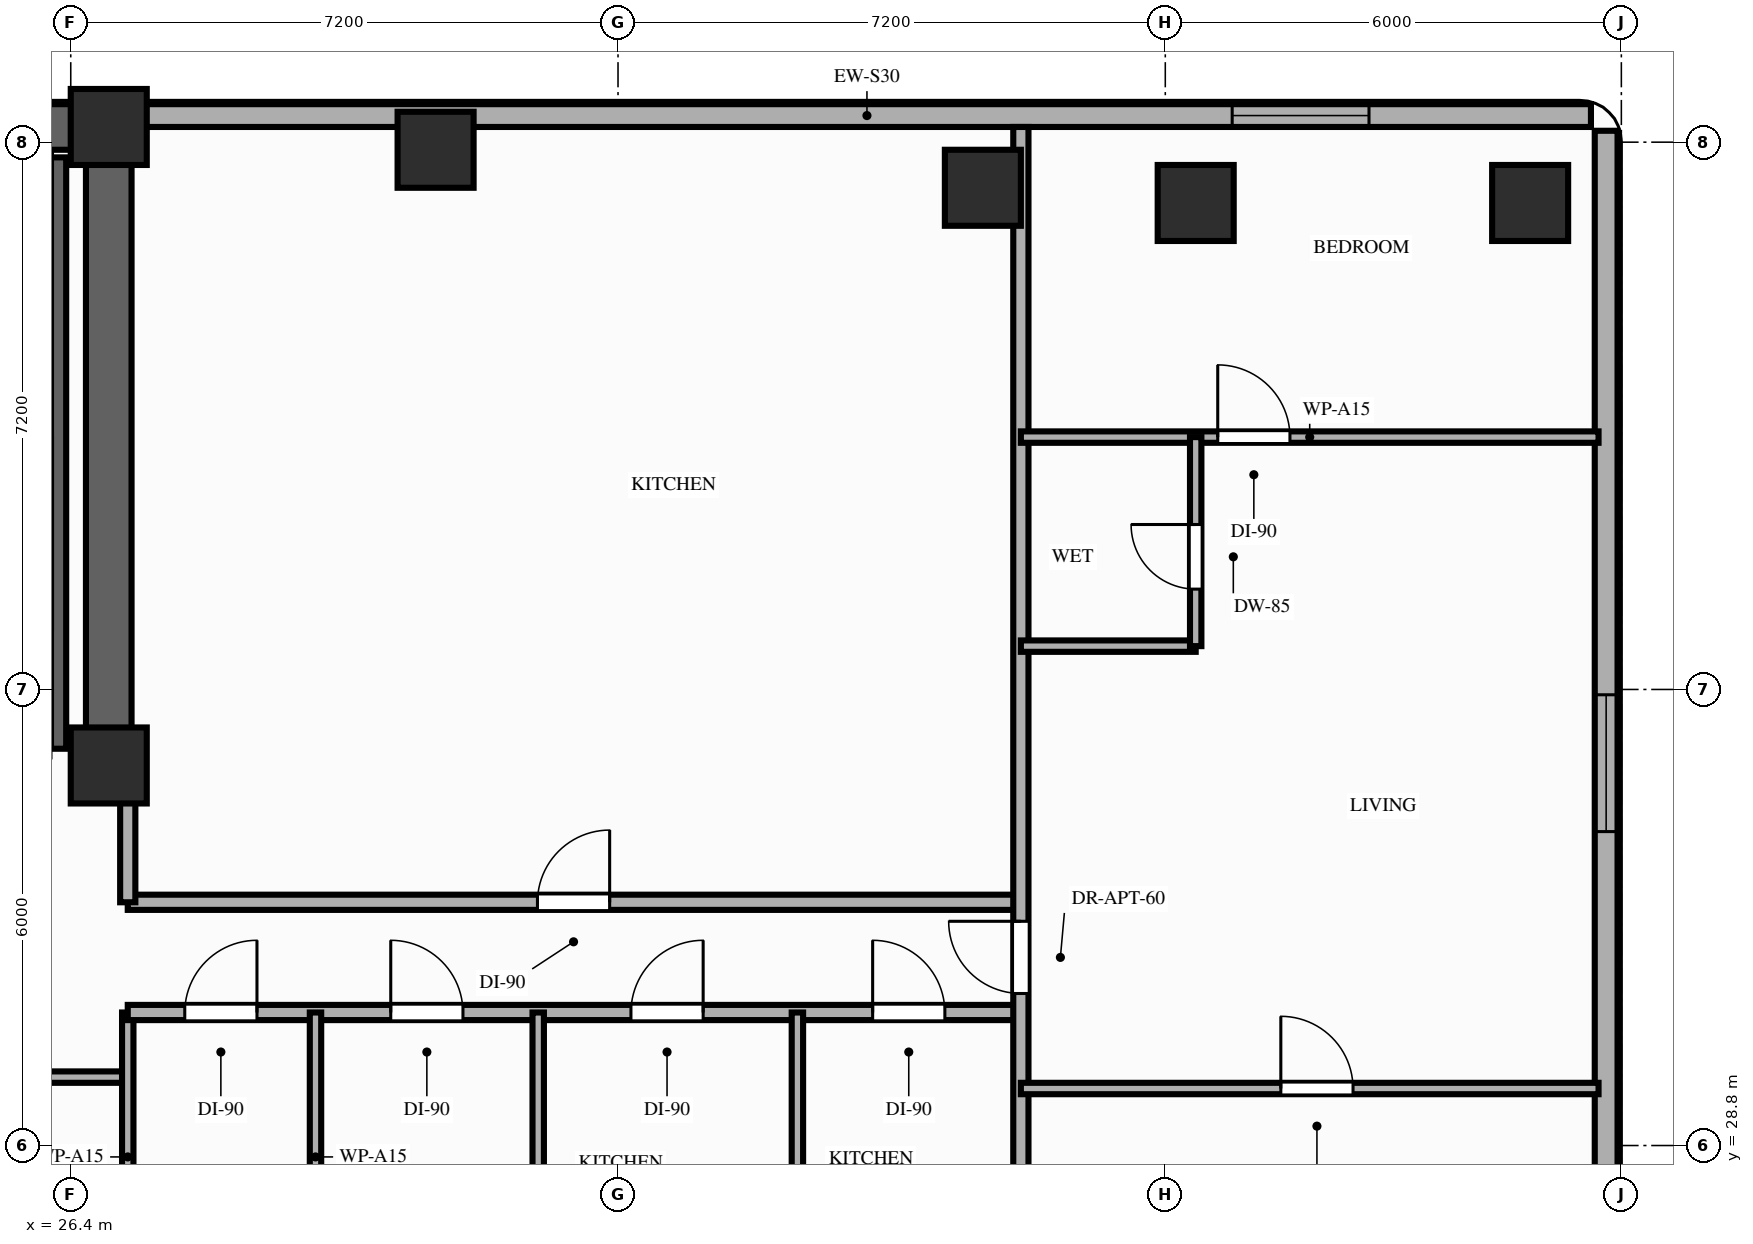
"""IFC4 building model, lengths in metres.
Left out: names, types, materials, properties, quantities, classifications, styles, units other than length and angle.
Written with IfcOpenShell. Run it as: python <this file> out.ifc"""

import sys

from ifc_helpers import new_model, si_unit, direction, frame, frame_2d, origin, origin_2d, place, context, subcontext, project, spatial, rectangle, extrude, element, fill, save


model = new_model("IFC4")
c1 = context("Model", 3, precision=1e-05, world=origin(), true_north=direction((0.0, 1.0)))
c2 = subcontext(c1, "Body", "Model", "MODEL_VIEW")
j1 = project(units=[si_unit("LENGTHUNIT", "METRE"), si_unit("PLANEANGLEUNIT", "RADIAN")], contexts=[c1])
p1 = place(None, origin())
s1 = spatial("IfcSite", under=j1, at=p1, CompositionType="ELEMENT")
p2 = place(p1, origin())
s2 = spatial("IfcBuilding", under=s1, at=p2, CompositionType="ELEMENT")
p3 = place(p2, frame((0.0, 0.0, 120.2)))
s3 = spatial("IfcBuildingStorey", under=s2, at=p3, CompositionType="ELEMENT", Elevation=120.2)
for number, where, z_axis, x_axis in (
    (1, (26.9, 33.8, 0.0), (0.0, 0.0, 1.0), (1.0, 0.0, 0.0)),
    (2, (26.9, 42.2, 0.0), (0.0, 0.0, 1.0), (1.0, 0.0, 0.0)),
    (3, (31.2, 41.9, 0.0), (0.0, 0.0, 1.0), (1.0, 0.0, 0.0)),
    (4, (38.4, 41.4, 0.0), (0.0, 0.0, 1.0), (1.0, 0.0, 0.0)),
    (5, (41.2, 41.2, 0.0), (0.0, 0.0, 1.0), (1.0, 0.0, 0.0)),
    (6, (45.6, 41.2, 0.0), (0.0, 0.0, 1.0), (1.0, 0.0, 0.0)),
):
    element("IfcColumn", number, at=place(p3, frame(where, z_axis=z_axis, x_axis=x_axis)), inside=s3, PredefinedType="COLUMN", context=c2, shape_type="SweptSolid", body=[
        extrude(rectangle(XDim=1.0, YDim=1.0, at=origin_2d()), origin(), (0.0, 0.0, 1.0), 3.2),
    ])
p4 = place(p3, frame((46.4, 42.35, 0.0), z_axis=(0.0, 0.0, 1.0), x_axis=(-1.0, 0.0, 0.0)))
e7 = element("IfcWall", 7, at=p4, inside=s3, PredefinedType="STANDARD", context=c2, shape_type="SweptSolid", body=[
    extrude(rectangle(XDim=19.05, YDim=0.3, at=frame_2d((9.525, 0.0))), origin(), (0.0, 0.0, 1.0), 2.41),
])
p5 = place(p4, frame((2.92, 0.0, 0.85)))
e8 = element("IfcOpeningElement", 8, at=p5, cuts=e7, PredefinedType="OPENING", context=c2, shape_type="SweptSolid", body=[
    extrude(rectangle(XDim=1.8, YDim=1.31, at=frame_2d((0.9, 0.655))), frame((0.0, 0.16, 0.0), z_axis=(0.0, -1.0, 0.0), x_axis=(1.0, 0.0, 0.0)), (0.0, 0.0, 1.0), 0.32),
])
p6 = place(p3, frame((46.6, 26.8, 0.0), z_axis=(0.0, 0.0, 1.0), x_axis=(0.0, 1.0, 0.0)))
e9 = element("IfcWall", 9, at=p6, inside=s3, PredefinedType="STANDARD", context=c2, shape_type="SweptSolid", body=[
    extrude(rectangle(XDim=15.35, YDim=0.3, at=frame_2d((7.675, 0.0))), origin(), (0.0, 0.0, 1.0), 3.02),
])
p7 = place(p6, frame((6.13, 0.0, 0.85)))
e10 = element("IfcOpeningElement", 10, at=p7, cuts=e9, PredefinedType="OPENING", context=c2, shape_type="SweptSolid", body=[
    extrude(rectangle(XDim=1.8, YDim=1.75, at=frame_2d((0.9, 0.875))), frame((0.0, 0.16, 0.0), z_axis=(0.0, -1.0, 0.0), x_axis=(1.0, 0.0, 0.0)), (0.0, 0.0, 1.0), 0.32),
])
p8 = place(p3, frame((6.45, 42.2, 0.0), z_axis=(0.0, 0.0, 1.0), x_axis=(1.0, 0.0, 0.0)))
e11 = element("IfcWall", 11, at=p8, inside=s3, PredefinedType="SHEAR", context=c2, shape_type="SweptSolid", body=[
    extrude(rectangle(XDim=20.45, YDim=0.6, at=frame_2d((10.225, 0.0))), origin(), (0.0, 0.0, 1.0), 3.02),
])
p9 = place(p3, frame((26.9, 33.8, 0.0), z_axis=(0.0, 0.0, 1.0), x_axis=(0.0, 1.0, 0.0)))
e12 = element("IfcWall", 12, at=p9, inside=s3, PredefinedType="SHEAR", context=c2, shape_type="SweptSolid", body=[
    extrude(rectangle(XDim=7.95, YDim=0.6, at=frame_2d((3.975, 0.0))), origin(), (0.0, 0.0, 1.0), 3.02),
])
p10 = place(p3, frame((26.24, 34.02, 0.0), z_axis=(0.0, 0.0, 1.0), x_axis=(0.0, 1.0, 0.0)))
e13 = element("IfcWall", 13, at=p10, inside=s3, PredefinedType="SHEAR", context=c2, shape_type="SweptSolid", body=[
    extrude(rectangle(XDim=7.78, YDim=0.2, at=frame_2d((3.89, 0.0))), origin(), (0.0, 0.0, 1.0), 3.02),
])
p11 = place(p3, frame((20.45, 29.7, 0.0), z_axis=(0.0, 0.0, 1.0), x_axis=(1.0, 0.0, 0.0)))
e14 = element("IfcWall", 14, at=p11, inside=s3, PredefinedType="PARTITIONING", context=c2, shape_type="SweptSolid", body=[
    extrude(rectangle(XDim=6.7, YDim=0.15, at=frame_2d((3.35, 0.0))), origin(), (0.0, 0.0, 1.0), 3.02),
])
p12 = place(p11, frame((2.8, 0.0, 0.0)))
e15 = element("IfcOpeningElement", 15, at=p12, cuts=e14, PredefinedType="OPENING", context=c2, shape_type="SweptSolid", body=[
    extrude(rectangle(XDim=0.95, YDim=2.15, at=frame_2d((0.475, 1.075))), frame((0.0, 0.085, 0.0), z_axis=(0.0, -1.0, 0.0), x_axis=(1.0, 0.0, 0.0)), (0.0, 0.0, 1.0), 0.17),
])
p13 = place(p3, frame((27.15, 26.75, 0.0), z_axis=(0.0, 0.0, 1.0), x_axis=(0.0, 1.0, 0.0)))
e16 = element("IfcWall", 16, at=p13, inside=s3, PredefinedType="PARTITIONING", context=c2, shape_type="SweptSolid", body=[
    extrude(rectangle(XDim=3.8, YDim=0.15, at=frame_2d((1.9, 0.0))), origin(), (0.0, 0.0, 1.0), 2.41),
])
p14 = place(p3, frame((27.15, 30.55, 0.0), z_axis=(0.0, 0.0, 1.0), x_axis=(1.0, 0.0, 0.0)))
e17 = element("IfcWall", 17, at=p14, inside=s3, PredefinedType="PARTITIONING", context=c2, shape_type="SweptSolid", body=[
    extrude(rectangle(XDim=11.75, YDim=0.2, at=frame_2d((5.875, 0.0))), origin(), (0.0, 0.0, 1.0), 2.41),
])
p15 = place(p14, frame((0.75, 0.0, 0.0)))
e18 = element("IfcOpeningElement", 18, at=p15, cuts=e17, PredefinedType="OPENING", context=c2, shape_type="SweptSolid", body=[
    extrude(rectangle(XDim=0.95, YDim=2.15, at=frame_2d((0.475, 1.075))), frame((0.0, 0.11, 0.0), z_axis=(0.0, -1.0, 0.0), x_axis=(1.0, 0.0, 0.0)), (0.0, 0.0, 1.0), 0.22),
])
p16 = place(p14, frame((3.46, 0.0, 0.0)))
e19 = element("IfcOpeningElement", 19, at=p16, cuts=e17, PredefinedType="OPENING", context=c2, shape_type="SweptSolid", body=[
    extrude(rectangle(XDim=0.95, YDim=2.15, at=frame_2d((0.475, 1.075))), frame((0.0, 0.11, 0.0), z_axis=(0.0, -1.0, 0.0), x_axis=(1.0, 0.0, 0.0)), (0.0, 0.0, 1.0), 0.22),
])
p17 = place(p14, frame((6.62, 0.0, 0.0)))
e20 = element("IfcOpeningElement", 20, at=p17, cuts=e17, PredefinedType="OPENING", context=c2, shape_type="SweptSolid", body=[
    extrude(rectangle(XDim=0.95, YDim=2.15, at=frame_2d((0.475, 1.075))), frame((0.0, 0.11, 0.0), z_axis=(0.0, -1.0, 0.0), x_axis=(1.0, 0.0, 0.0)), (0.0, 0.0, 1.0), 0.22),
])
p18 = place(p14, frame((9.8, 0.0, 0.0)))
e21 = element("IfcOpeningElement", 21, at=p18, cuts=e17, PredefinedType="OPENING", context=c2, shape_type="SweptSolid", body=[
    extrude(rectangle(XDim=0.95, YDim=2.15, at=frame_2d((0.475, 1.075))), frame((0.0, 0.11, 0.0), z_axis=(0.0, -1.0, 0.0), x_axis=(1.0, 0.0, 0.0)), (0.0, 0.0, 1.0), 0.22),
])
p19 = place(p3, frame((27.15, 32.0, 0.0), z_axis=(0.0, 0.0, 1.0), x_axis=(1.0, 0.0, 0.0)))
e22 = element("IfcWall", 22, at=p19, inside=s3, PredefinedType="PARTITIONING", context=c2, shape_type="SweptSolid", body=[
    extrude(rectangle(XDim=11.75, YDim=0.2, at=frame_2d((5.875, 0.0))), origin(), (0.0, 0.0, 1.0), 2.41),
])
p20 = place(p19, frame((5.39, 0.0, 0.0)))
e23 = element("IfcOpeningElement", 23, at=p20, cuts=e22, PredefinedType="OPENING", context=c2, shape_type="SweptSolid", body=[
    extrude(rectangle(XDim=0.95, YDim=2.15, at=frame_2d((0.475, 1.075))), frame((0.0, 0.11, 0.0), z_axis=(0.0, -1.0, 0.0), x_axis=(1.0, 0.0, 0.0)), (0.0, 0.0, 1.0), 0.22),
])
p21 = place(p3, frame((27.15, 32.0, 0.0), z_axis=(0.0, 0.0, 1.0), x_axis=(0.0, 1.0, 0.0)))
e24 = element("IfcWall", 24, at=p21, inside=s3, PredefinedType="PARTITIONING", context=c2, shape_type="SweptSolid", body=[
    extrude(rectangle(XDim=1.68, YDim=0.2, at=frame_2d((0.84, 0.0))), origin(), (0.0, 0.0, 1.0), 2.41),
])
p22 = place(p3, frame((38.9, 26.75, 0.0), z_axis=(0.0, 0.0, 1.0), x_axis=(0.0, 1.0, 0.0)))
e25 = element("IfcWall", 25, at=p22, inside=s3, PredefinedType="PARTITIONING", context=c2, shape_type="SweptSolid", body=[
    extrude(rectangle(XDim=15.45, YDim=0.2, at=frame_2d((7.725, 0.0))), origin(), (0.0, 0.0, 1.0), 2.41),
])
p23 = place(p22, frame((4.05, 0.0, 0.0)))
e26 = element("IfcOpeningElement", 26, at=p23, cuts=e25, PredefinedType="OPENING", context=c2, shape_type="SweptSolid", body=[
    extrude(rectangle(XDim=0.95, YDim=2.15, at=frame_2d((0.475, 1.075))), frame((0.0, 0.11, 0.0), z_axis=(0.0, -1.0, 0.0), x_axis=(1.0, 0.0, 0.0)), (0.0, 0.0, 1.0), 0.22),
])
p24 = place(p3, frame((38.9, 29.55, 0.0), z_axis=(0.0, 0.0, 1.0), x_axis=(1.0, 0.0, 0.0)))
e27 = element("IfcWall", 27, at=p24, inside=s3, PredefinedType="PARTITIONING", context=c2, shape_type="SweptSolid", body=[
    extrude(rectangle(XDim=7.6, YDim=0.15, at=frame_2d((3.8, 0.0))), origin(), (0.0, 0.0, 1.0), 2.41),
])
p25 = place(p24, frame((3.42, 0.0, 0.0)))
e28 = element("IfcOpeningElement", 28, at=p25, cuts=e27, PredefinedType="OPENING", context=c2, shape_type="SweptSolid", body=[
    extrude(rectangle(XDim=0.95, YDim=2.15, at=frame_2d((0.475, 1.075))), frame((0.0, 0.085, 0.0), z_axis=(0.0, -1.0, 0.0), x_axis=(1.0, 0.0, 0.0)), (0.0, 0.0, 1.0), 0.17),
])
p26 = place(p3, frame((38.9, 38.12, 0.0), z_axis=(0.0, 0.0, 1.0), x_axis=(1.0, 0.0, 0.0)))
e29 = element("IfcWall", 29, at=p26, inside=s3, PredefinedType="PARTITIONING", context=c2, shape_type="SweptSolid", body=[
    extrude(rectangle(XDim=7.6, YDim=0.15, at=frame_2d((3.8, 0.0))), origin(), (0.0, 0.0, 1.0), 2.41),
])
p27 = place(p26, frame((2.59, 0.0, 0.0)))
e30 = element("IfcOpeningElement", 30, at=p27, cuts=e29, PredefinedType="OPENING", context=c2, shape_type="SweptSolid", body=[
    extrude(rectangle(XDim=0.95, YDim=2.15, at=frame_2d((0.475, 1.075))), frame((0.0, 0.085, 0.0), z_axis=(0.0, -1.0, 0.0), x_axis=(1.0, 0.0, 0.0)), (0.0, 0.0, 1.0), 0.17),
])
p28 = place(p3, frame((38.9, 35.37, 0.0), z_axis=(0.0, 0.0, 1.0), x_axis=(1.0, 0.0, 0.0)))
e31 = element("IfcWall", 31, at=p28, inside=s3, PredefinedType="PARTITIONING", context=c2, shape_type="SweptSolid", body=[
    extrude(rectangle(XDim=2.3, YDim=0.15, at=frame_2d((1.15, 0.0))), origin(), (0.0, 0.0, 1.0), 2.41),
])
p29 = place(p3, frame((41.2, 35.37, 0.0), z_axis=(0.0, 0.0, 1.0), x_axis=(0.0, 1.0, 0.0)))
e32 = element("IfcWall", 32, at=p29, inside=s3, PredefinedType="PARTITIONING", context=c2, shape_type="SweptSolid", body=[
    extrude(rectangle(XDim=2.75, YDim=0.15, at=frame_2d((1.375, 0.0))), origin(), (0.0, 0.0, 1.0), 2.41),
])
p30 = place(p29, frame((0.75, 0.0, 0.0)))
e33 = element("IfcOpeningElement", 33, at=p30, cuts=e32, PredefinedType="OPENING", context=c2, shape_type="SweptSolid", body=[
    extrude(rectangle(XDim=0.85, YDim=2.1, at=frame_2d((0.425, 1.05))), frame((0.0, 0.085, 0.0), z_axis=(0.0, -1.0, 0.0), x_axis=(1.0, 0.0, 0.0)), (0.0, 0.0, 1.0), 0.17),
])
for number, where, z_axis, x_axis in (
    (34, (29.62, 26.75, 0.0), (0.0, 0.0, 1.0), (0.0, 1.0, 0.0)),
    (35, (32.55, 26.75, 0.0), (0.0, 0.0, 1.0), (0.0, 1.0, 0.0)),
    (36, (35.96, 26.75, 0.0), (0.0, 0.0, 1.0), (0.0, 1.0, 0.0)),
):
    element("IfcWall", number, at=place(p3, frame(where, z_axis=z_axis, x_axis=x_axis)), inside=s3, PredefinedType="PARTITIONING", context=c2, shape_type="SweptSolid", body=[
        extrude(rectangle(XDim=3.8, YDim=0.15, at=frame_2d((1.9, 0.0))), origin(), (0.0, 0.0, 1.0), 2.41),
    ])
p31 = place(p7, origin())
e37 = element("IfcWindow", 37, at=p31, inside=s3, PartitioningType="SINGLE_PANEL", PredefinedType="WINDOW", context=c2, shape_type="SweptSolid", body=[
    extrude(rectangle(XDim=1.8, YDim=1.75, at=frame_2d((0.9, 0.875))), frame((0.0, 0.03, 0.0), z_axis=(0.0, -1.0, 0.0), x_axis=(1.0, 0.0, 0.0)), (0.0, 0.0, 1.0), 0.06),
])
fill(e10, e37)
p32 = place(p5, origin())
e38 = element("IfcWindow", 38, at=p32, inside=s3, PartitioningType="SINGLE_PANEL", PredefinedType="WINDOW", context=c2, shape_type="SweptSolid", body=[
    extrude(rectangle(XDim=1.8, YDim=1.31, at=frame_2d((0.9, 0.655))), frame((0.0, 0.03, 0.0), z_axis=(0.0, -1.0, 0.0), x_axis=(1.0, 0.0, 0.0)), (0.0, 0.0, 1.0), 0.06),
])
fill(e8, e38)
p33 = place(p23, origin())
e39 = element("IfcDoor", 39, at=p33, inside=s3, OperationType="SINGLE_SWING_RIGHT", PredefinedType="DOOR", context=c2, shape_type="SweptSolid", body=[
    extrude(rectangle(XDim=0.95, YDim=2.15, at=frame_2d((0.475, 1.075))), frame((0.0, 0.025, 0.0), z_axis=(0.0, -1.0, 0.0), x_axis=(1.0, 0.0, 0.0)), (0.0, 0.0, 1.0), 0.05),
])
fill(e26, e39)
p34 = place(p27, origin())
e40 = element("IfcDoor", 40, at=p34, inside=s3, OperationType="SINGLE_SWING_LEFT", PredefinedType="DOOR", context=c2, shape_type="SweptSolid", body=[
    extrude(rectangle(XDim=0.95, YDim=2.15, at=frame_2d((0.475, 1.075))), frame((0.0, 0.025, 0.0), z_axis=(0.0, -1.0, 0.0), x_axis=(1.0, 0.0, 0.0)), (0.0, 0.0, 1.0), 0.05),
])
fill(e30, e40)
p35 = place(p30, origin())
e41 = element("IfcDoor", 41, at=p35, inside=s3, OperationType="SINGLE_SWING_RIGHT", PredefinedType="DOOR", context=c2, shape_type="SweptSolid", body=[
    extrude(rectangle(XDim=0.85, YDim=2.1, at=frame_2d((0.425, 1.05))), frame((0.0, 0.025, 0.0), z_axis=(0.0, -1.0, 0.0), x_axis=(1.0, 0.0, 0.0)), (0.0, 0.0, 1.0), 0.05),
])
fill(e33, e41)
p36 = place(p25, origin())
e42 = element("IfcDoor", 42, at=p36, inside=s3, OperationType="SINGLE_SWING_LEFT", PredefinedType="DOOR", context=c2, shape_type="SweptSolid", body=[
    extrude(rectangle(XDim=0.95, YDim=2.15, at=frame_2d((0.475, 1.075))), frame((0.0, 0.025, 0.0), z_axis=(0.0, -1.0, 0.0), x_axis=(1.0, 0.0, 0.0)), (0.0, 0.0, 1.0), 0.05),
])
fill(e28, e42)
p37 = place(p15, origin())
e43 = element("IfcDoor", 43, at=p37, inside=s3, OperationType="SINGLE_SWING_RIGHT", PredefinedType="DOOR", context=c2, shape_type="SweptSolid", body=[
    extrude(rectangle(XDim=0.95, YDim=2.15, at=frame_2d((0.475, 1.075))), frame((0.0, 0.025, 0.0), z_axis=(0.0, -1.0, 0.0), x_axis=(1.0, 0.0, 0.0)), (0.0, 0.0, 1.0), 0.05),
])
fill(e18, e43)
p38 = place(p16, origin())
e44 = element("IfcDoor", 44, at=p38, inside=s3, OperationType="SINGLE_SWING_LEFT", PredefinedType="DOOR", context=c2, shape_type="SweptSolid", body=[
    extrude(rectangle(XDim=0.95, YDim=2.15, at=frame_2d((0.475, 1.075))), frame((0.0, 0.025, 0.0), z_axis=(0.0, -1.0, 0.0), x_axis=(1.0, 0.0, 0.0)), (0.0, 0.0, 1.0), 0.05),
])
fill(e19, e44)
p39 = place(p17, origin())
e45 = element("IfcDoor", 45, at=p39, inside=s3, OperationType="SINGLE_SWING_RIGHT", PredefinedType="DOOR", context=c2, shape_type="SweptSolid", body=[
    extrude(rectangle(XDim=0.95, YDim=2.15, at=frame_2d((0.475, 1.075))), frame((0.0, 0.025, 0.0), z_axis=(0.0, -1.0, 0.0), x_axis=(1.0, 0.0, 0.0)), (0.0, 0.0, 1.0), 0.05),
])
fill(e20, e45)
p40 = place(p18, origin())
e46 = element("IfcDoor", 46, at=p40, inside=s3, OperationType="SINGLE_SWING_LEFT", PredefinedType="DOOR", context=c2, shape_type="SweptSolid", body=[
    extrude(rectangle(XDim=0.95, YDim=2.15, at=frame_2d((0.475, 1.075))), frame((0.0, 0.025, 0.0), z_axis=(0.0, -1.0, 0.0), x_axis=(1.0, 0.0, 0.0)), (0.0, 0.0, 1.0), 0.05),
])
fill(e21, e46)
p41 = place(p20, origin())
e47 = element("IfcDoor", 47, at=p41, inside=s3, OperationType="SINGLE_SWING_RIGHT", PredefinedType="DOOR", context=c2, shape_type="SweptSolid", body=[
    extrude(rectangle(XDim=0.95, YDim=2.15, at=frame_2d((0.475, 1.075))), frame((0.0, 0.025, 0.0), z_axis=(0.0, -1.0, 0.0), x_axis=(1.0, 0.0, 0.0)), (0.0, 0.0, 1.0), 0.05),
])
fill(e23, e47)
save(model, sys.argv[1])
